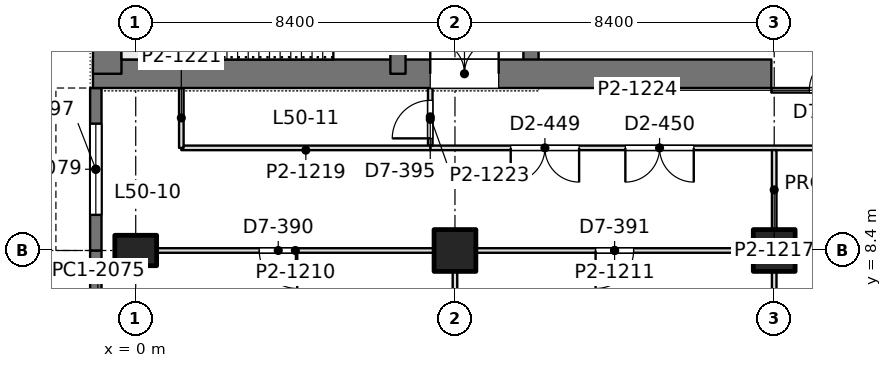
"""IFC4 building model, lengths in metres.
Left out: names, types, materials, properties, quantities, classifications, styles, units other than length and angle.
Written with IfcOpenShell. Run it as: python <this file> out.ifc"""

import sys

from ifc_helpers import new_model, si_unit, direction, frame, frame_2d, origin, origin_2d, place, context, subcontext, project, spatial, rectangle, extrude, element, fill, save


model = new_model("IFC4")
c1 = context("Model", 3, precision=1e-05, world=origin(), true_north=direction((0.0, 1.0)))
c2 = subcontext(c1, "Body", "Model", "MODEL_VIEW")
j1 = project(units=[si_unit("LENGTHUNIT", "METRE"), si_unit("PLANEANGLEUNIT", "RADIAN")], contexts=[c1])
p1 = place(None, origin())
s1 = spatial("IfcSite", under=j1, at=p1, CompositionType="ELEMENT")
p2 = place(p1, origin())
s2 = spatial("IfcBuilding", under=s1, at=p2, CompositionType="ELEMENT")
p3 = place(p2, frame((0.0, 0.0, 219.6)))
s3 = spatial("IfcBuildingStorey", under=s2, at=p3, CompositionType="ELEMENT", Elevation=219.6)
p4 = place(p3, frame((0.0, 8.4, 0.0), z_axis=(0.0, 0.0, 1.0), x_axis=(0.0, 1.0, 0.0)))
e1 = element("IfcColumn", 1, at=p4, inside=s3, PredefinedType="COLUMN", context=c2, shape_type="SweptSolid", body=[
    extrude(rectangle(XDim=0.8, YDim=1.1, at=origin_2d()), origin(), (0.0, 0.0, 1.0), 4.2),
])
for number, where, z_axis, x_axis in (
    (2, (8.4, 8.4, 0.0), (0.0, 0.0, 1.0), (1.0, 0.0, 0.0)),
    (3, (16.8, 8.4, 0.0), (0.0, 0.0, 1.0), (1.0, 0.0, 0.0)),
):
    element("IfcColumn", number, at=place(p3, frame(where, z_axis=z_axis, x_axis=x_axis)), inside=s3, PredefinedType="COLUMN", context=c2, shape_type="SweptSolid", body=[
        extrude(rectangle(XDim=1.1, YDim=1.1, at=origin_2d()), origin(), (0.0, 0.0, 1.0), 4.2),
    ])
p5 = place(p3, frame((-1.125, 13.05, 0.0), z_axis=(0.0, 0.0, 1.0), x_axis=(1.0, 0.0, 0.0)))
e4 = element("IfcWall", 4, at=p5, inside=s3, PredefinedType="SHEAR", context=c2, shape_type="SweptSolid", body=[
    extrude(rectangle(XDim=17.85, YDim=0.75, at=frame_2d((8.925, 0.0))), origin(), (0.0, 0.0, 1.0), 4.2),
])
p6 = place(p5, frame((8.875, 0.0, 0.0)))
e5 = element("IfcOpeningElement", 5, at=p6, cuts=e4, PredefinedType="OPENING", context=c2, shape_type="SweptSolid", body=[
    extrude(rectangle(XDim=1.8, YDim=2.4, at=frame_2d((0.9, 1.2))), frame((0.0, 0.385, 0.0), z_axis=(0.0, -1.0, 0.0), x_axis=(1.0, 0.0, 0.0)), (0.0, 0.0, 1.0), 0.77),
])
p7 = place(p3, frame((-0.75, 13.05, 0.0), z_axis=(0.0, 0.0, 1.0), x_axis=(0.0, 1.0, 0.0)))
e6 = element("IfcWall", 6, at=p7, inside=s3, PredefinedType="SHEAR", context=c2, shape_type="SweptSolid", body=[
    extrude(rectangle(XDim=24.3, YDim=0.75, at=frame_2d((12.15, 0.0))), origin(), (0.0, 0.0, 1.0), 4.2),
])
p8 = place(p3, frame((6.9, 13.05, 0.0), z_axis=(0.0, 0.0, 1.0), x_axis=(0.0, 1.0, 0.0)))
e7 = element("IfcWall", 7, at=p8, inside=s3, PredefinedType="SHEAR", context=c2, shape_type="SweptSolid", body=[
    extrude(rectangle(XDim=24.3, YDim=0.4, at=frame_2d((12.15, 0.0))), origin(), (0.0, 0.0, 1.0), 4.2),
])
p9 = place(p8, frame((1.3, 0.0, 0.0)))
e8 = element("IfcOpeningElement", 8, at=p9, cuts=e7, PredefinedType="OPENING", context=c2, shape_type="SweptSolid", body=[
    extrude(rectangle(XDim=1.0, YDim=2.2, at=frame_2d((0.5, 1.1))), frame((0.0, 0.21, 0.0), z_axis=(0.0, -1.0, 0.0), x_axis=(1.0, 0.0, 0.0)), (0.0, 0.0, 1.0), 0.42),
])
p10 = place(p8, frame((22.0, 0.0, 0.0)))
e9 = element("IfcOpeningElement", 9, at=p10, cuts=e7, PredefinedType="OPENING", context=c2, shape_type="SweptSolid", body=[
    extrude(rectangle(XDim=1.0, YDim=2.2, at=frame_2d((0.5, 1.1))), frame((0.0, 0.21, 0.0), z_axis=(0.0, -1.0, 0.0), x_axis=(1.0, 0.0, 0.0)), (0.0, 0.0, 1.0), 0.42),
])
p11 = place(p8, frame((5.55, 0.0, 0.0)))
e10 = element("IfcOpeningElement", 10, at=p11, cuts=e7, PredefinedType="OPENING", context=c2, shape_type="SweptSolid", body=[
    extrude(rectangle(XDim=1.0, YDim=2.2, at=frame_2d((0.5, 1.1))), frame((0.0, 0.21, 0.0), z_axis=(0.0, -1.0, 0.0), x_axis=(1.0, 0.0, 0.0)), (0.0, 0.0, 1.0), 0.42),
])
p12 = place(p8, frame((9.55, 0.0, 0.0)))
e11 = element("IfcOpeningElement", 11, at=p12, cuts=e7, PredefinedType="OPENING", context=c2, shape_type="SweptSolid", body=[
    extrude(rectangle(XDim=1.0, YDim=2.2, at=frame_2d((0.5, 1.1))), frame((0.0, 0.21, 0.0), z_axis=(0.0, -1.0, 0.0), x_axis=(1.0, 0.0, 0.0)), (0.0, 0.0, 1.0), 0.42),
])
p13 = place(p8, frame((12.8, 0.0, 0.0)))
e12 = element("IfcOpeningElement", 12, at=p13, cuts=e7, PredefinedType="OPENING", context=c2, shape_type="SweptSolid", body=[
    extrude(rectangle(XDim=1.1, YDim=2.2, at=frame_2d((0.55, 1.1))), frame((0.0, 0.21, 0.0), z_axis=(0.0, -1.0, 0.0), x_axis=(1.0, 0.0, 0.0)), (0.0, 0.0, 1.0), 0.42),
])
p14 = place(p8, frame((15.538, 0.0, 0.0)))
e13 = element("IfcOpeningElement", 13, at=p14, cuts=e7, PredefinedType="OPENING", context=c2, shape_type="SweptSolid", body=[
    extrude(rectangle(XDim=1.1, YDim=2.2, at=frame_2d((0.55, 1.1))), frame((0.0, 0.21, 0.0), z_axis=(0.0, -1.0, 0.0), x_axis=(1.0, 0.0, 0.0)), (0.0, 0.0, 1.0), 0.42),
])
p15 = place(p8, frame((18.262, 0.0, 0.0)))
e14 = element("IfcOpeningElement", 14, at=p15, cuts=e7, PredefinedType="OPENING", context=c2, shape_type="SweptSolid", body=[
    extrude(rectangle(XDim=1.1, YDim=2.2, at=frame_2d((0.55, 1.1))), frame((0.0, 0.21, 0.0), z_axis=(0.0, -1.0, 0.0), x_axis=(1.0, 0.0, 0.0)), (0.0, 0.0, 1.0), 0.42),
])
p16 = place(p3, frame((10.4, 13.05, 0.0), z_axis=(0.0, 0.0, 1.0), x_axis=(0.0, 1.0, 0.0)))
e15 = element("IfcWall", 15, at=p16, inside=s3, PredefinedType="SHEAR", context=c2, shape_type="SweptSolid", body=[
    extrude(rectangle(XDim=24.3, YDim=0.4, at=frame_2d((12.15, 0.0))), origin(), (0.0, 0.0, 1.0), 4.2),
])
p17 = place(p16, frame((15.75, 0.0, 0.0)))
e16 = element("IfcOpeningElement", 16, at=p17, cuts=e15, PredefinedType="OPENING", context=c2, shape_type="SweptSolid", body=[
    extrude(rectangle(XDim=1.1, YDim=2.2, at=frame_2d((0.55, 1.1))), frame((0.0, 0.21, 0.0), z_axis=(0.0, -1.0, 0.0), x_axis=(1.0, 0.0, 0.0)), (0.0, 0.0, 1.0), 0.42),
])
p18 = place(p16, frame((18.6, 0.0, 0.0)))
e17 = element("IfcOpeningElement", 17, at=p18, cuts=e15, PredefinedType="OPENING", context=c2, shape_type="SweptSolid", body=[
    extrude(rectangle(XDim=1.1, YDim=2.2, at=frame_2d((0.55, 1.1))), frame((0.0, 0.21, 0.0), z_axis=(0.0, -1.0, 0.0), x_axis=(1.0, 0.0, 0.0)), (0.0, 0.0, 1.0), 0.42),
])
p19 = place(p16, frame((21.45, 0.0, 0.0)))
e18 = element("IfcOpeningElement", 18, at=p19, cuts=e15, PredefinedType="OPENING", context=c2, shape_type="SweptSolid", body=[
    extrude(rectangle(XDim=1.1, YDim=2.2, at=frame_2d((0.55, 1.1))), frame((0.0, 0.21, 0.0), z_axis=(0.0, -1.0, 0.0), x_axis=(1.0, 0.0, 0.0)), (0.0, 0.0, 1.0), 0.42),
])
p20 = place(p16, frame((8.65, 0.0, 0.0)))
e19 = element("IfcOpeningElement", 19, at=p20, cuts=e15, PredefinedType="OPENING", context=c2, shape_type="SweptSolid", body=[
    extrude(rectangle(XDim=1.8, YDim=2.4, at=frame_2d((0.9, 1.2))), frame((0.0, 0.21, 0.0), z_axis=(0.0, -1.0, 0.0), x_axis=(1.0, 0.0, 0.0)), (0.0, 0.0, 1.0), 0.42),
])
p21 = place(p3, frame((-1.05, 5.915, 0.0), z_axis=(0.0, 0.0, 1.0), x_axis=(0.0, 1.0, 0.0)))
e20 = element("IfcWall", 20, at=p21, inside=s3, PredefinedType="SOLIDWALL", context=c2, shape_type="SweptSolid", body=[
    extrude(rectangle(XDim=2.485, YDim=0.3, at=frame_2d((1.243, 0.0))), origin(), (0.0, 0.0, 1.0), 4.05),
])
p22 = place(p3, frame((-1.05, 8.4, 0.0), z_axis=(0.0, 0.0, 1.0), x_axis=(0.0, 1.0, 0.0)))
e21 = element("IfcWall", 21, at=p22, inside=s3, PredefinedType="SOLIDWALL", context=c2, shape_type="SweptSolid", body=[
    extrude(rectangle(XDim=4.275, YDim=0.3, at=frame_2d((2.138, 0.0))), origin(), (0.0, 0.0, 1.0), 4.05),
])
p23 = place(p22, frame((0.938, 0.0, 0.9)))
e22 = element("IfcOpeningElement", 22, at=p23, cuts=e21, PredefinedType="OPENING", context=c2, shape_type="SweptSolid", body=[
    extrude(rectangle(XDim=2.4, YDim=1.9, at=frame_2d((1.2, 0.95))), frame((0.0, 0.16, 0.0), z_axis=(0.0, -1.0, 0.0), x_axis=(1.0, 0.0, 0.0)), (0.0, 0.0, 1.0), 0.32),
])
p24 = place(p3, frame((0.549, 8.4, 0.0), z_axis=(0.0, 0.0, 1.0), x_axis=(1.0, 0.0, 0.0)))
e23 = element("IfcWall", 23, at=p24, inside=s3, PredefinedType="PARTITIONING", context=c2, shape_type="SweptSolid", body=[
    extrude(rectangle(XDim=7.302, YDim=0.12, at=frame_2d((3.651, 0.0))), origin(), (0.0, 0.0, 1.0), 3.55),
])
p25 = place(p24, frame((2.701, 0.0, 0.0)))
e24 = element("IfcOpeningElement", 24, at=p25, cuts=e23, PredefinedType="OPENING", context=c2, shape_type="SweptSolid", body=[
    extrude(rectangle(XDim=1.0, YDim=2.4, at=frame_2d((0.5, 1.2))), frame((0.0, 0.07, 0.0), z_axis=(0.0, -1.0, 0.0), x_axis=(1.0, 0.0, 0.0)), (0.0, 0.0, 1.0), 0.14),
])
p26 = place(p3, frame((8.949, 8.4, 0.0), z_axis=(0.0, 0.0, 1.0), x_axis=(1.0, 0.0, 0.0)))
e25 = element("IfcWall", 25, at=p26, inside=s3, PredefinedType="PARTITIONING", context=c2, shape_type="SweptSolid", body=[
    extrude(rectangle(XDim=7.302, YDim=0.12, at=frame_2d((3.651, 0.0))), origin(), (0.0, 0.0, 1.0), 3.55),
])
p27 = place(p26, frame((3.151, 0.0, 0.0)))
e26 = element("IfcOpeningElement", 26, at=p27, cuts=e25, PredefinedType="OPENING", context=c2, shape_type="SweptSolid", body=[
    extrude(rectangle(XDim=1.0, YDim=2.4, at=frame_2d((0.5, 1.2))), frame((0.0, 0.07, 0.0), z_axis=(0.0, -1.0, 0.0), x_axis=(1.0, 0.0, 0.0)), (0.0, 0.0, 1.0), 0.14),
])
p28 = place(p3, frame((17.349, 8.4, 0.0), z_axis=(0.0, 0.0, 1.0), x_axis=(1.0, 0.0, 0.0)))
e27 = element("IfcWall", 27, at=p28, inside=s3, PredefinedType="PARTITIONING", context=c2, shape_type="SweptSolid", body=[
    extrude(rectangle(XDim=7.302, YDim=0.12, at=frame_2d((3.651, 0.0))), origin(), (0.0, 0.0, 1.0), 3.55),
])
p29 = place(p28, frame((3.151, 0.0, 0.0)))
e28 = element("IfcOpeningElement", 28, at=p29, cuts=e27, PredefinedType="OPENING", context=c2, shape_type="SweptSolid", body=[
    extrude(rectangle(XDim=1.0, YDim=2.4, at=frame_2d((0.5, 1.2))), frame((0.0, 0.07, 0.0), z_axis=(0.0, -1.0, 0.0), x_axis=(1.0, 0.0, 0.0)), (0.0, 0.0, 1.0), 0.14),
])
for number, where, z_axis, x_axis in (
    (29, (8.4, 6.149, 0.0), (0.0, 0.0, 1.0), (0.0, 1.0, 0.0)),
    (30, (16.8, 6.149, 0.0), (0.0, 0.0, 1.0), (0.0, 1.0, 0.0)),
):
    element("IfcWall", number, at=place(p3, frame(where, z_axis=z_axis, x_axis=x_axis)), inside=s3, PredefinedType="PARTITIONING", context=c2, shape_type="SweptSolid", body=[
        extrude(rectangle(XDim=1.702, YDim=0.12, at=frame_2d((0.851, 0.0))), origin(), (0.0, 0.0, 1.0), 3.69),
    ])
p30 = place(p3, frame((16.8, 8.949, 0.0), z_axis=(0.0, 0.0, 1.0), x_axis=(0.0, 1.0, 0.0)))
e31 = element("IfcWall", 31, at=p30, inside=s3, PredefinedType="PARTITIONING", context=c2, shape_type="SweptSolid", body=[
    extrude(rectangle(XDim=2.093, YDim=0.12, at=frame_2d((1.046, 0.0))), origin(), (0.0, 0.0, 1.0), 3.69),
])
p31 = place(p3, frame((7.748, 11.1, 0.0), z_axis=(0.0, 0.0, 1.0), x_axis=(1.0, 0.0, 0.0)))
e32 = element("IfcWall", 32, at=p31, inside=s3, PredefinedType="PARTITIONING", context=c2, shape_type="SweptSolid", body=[
    extrude(rectangle(XDim=41.452, YDim=0.12, at=frame_2d((20.726, 0.0))), origin(), (0.0, 0.0, 1.0), 3.55),
])
p32 = place(p31, frame((2.119, 0.0, 0.0)))
e33 = element("IfcOpeningElement", 33, at=p32, cuts=e32, PredefinedType="OPENING", context=c2, shape_type="SweptSolid", body=[
    extrude(rectangle(XDim=1.8, YDim=2.2, at=frame_2d((0.9, 1.1))), frame((0.0, 0.07, 0.0), z_axis=(0.0, -1.0, 0.0), x_axis=(1.0, 0.0, 0.0)), (0.0, 0.0, 1.0), 0.14),
])
p33 = place(p31, frame((5.135, 0.0, 0.0)))
e34 = element("IfcOpeningElement", 34, at=p33, cuts=e32, PredefinedType="OPENING", context=c2, shape_type="SweptSolid", body=[
    extrude(rectangle(XDim=1.8, YDim=2.2, at=frame_2d((0.9, 1.1))), frame((0.0, 0.07, 0.0), z_axis=(0.0, -1.0, 0.0), x_axis=(1.0, 0.0, 0.0)), (0.0, 0.0, 1.0), 0.14),
])
p34 = place(p31, frame((12.352, 0.0, 0.0)))
e35 = element("IfcOpeningElement", 35, at=p34, cuts=e32, PredefinedType="OPENING", context=c2, shape_type="SweptSolid", body=[
    extrude(rectangle(XDim=1.8, YDim=2.2, at=frame_2d((0.9, 1.1))), frame((0.0, 0.07, 0.0), z_axis=(0.0, -1.0, 0.0), x_axis=(1.0, 0.0, 0.0)), (0.0, 0.0, 1.0), 0.14),
])
p35 = place(p31, frame((20.752, 0.0, 0.0)))
e36 = element("IfcOpeningElement", 36, at=p35, cuts=e32, PredefinedType="OPENING", context=c2, shape_type="SweptSolid", body=[
    extrude(rectangle(XDim=1.8, YDim=2.2, at=frame_2d((0.9, 1.1))), frame((0.0, 0.07, 0.0), z_axis=(0.0, -1.0, 0.0), x_axis=(1.0, 0.0, 0.0)), (0.0, 0.0, 1.0), 0.14),
])
p36 = place(p31, frame((24.952, 0.0, 0.0)))
e37 = element("IfcOpeningElement", 37, at=p36, cuts=e32, PredefinedType="OPENING", context=c2, shape_type="SweptSolid", body=[
    extrude(rectangle(XDim=1.8, YDim=2.2, at=frame_2d((0.9, 1.1))), frame((0.0, 0.07, 0.0), z_axis=(0.0, -1.0, 0.0), x_axis=(1.0, 0.0, 0.0)), (0.0, 0.0, 1.0), 0.14),
])
p37 = place(p31, frame((32.952, 0.0, 0.0)))
e38 = element("IfcOpeningElement", 38, at=p37, cuts=e32, PredefinedType="OPENING", context=c2, shape_type="SweptSolid", body=[
    extrude(rectangle(XDim=1.8, YDim=2.2, at=frame_2d((0.9, 1.1))), frame((0.0, 0.07, 0.0), z_axis=(0.0, -1.0, 0.0), x_axis=(1.0, 0.0, 0.0)), (0.0, 0.0, 1.0), 0.14),
])
p38 = place(p31, frame((36.752, 0.0, 0.0)))
e39 = element("IfcOpeningElement", 39, at=p38, cuts=e32, PredefinedType="OPENING", context=c2, shape_type="SweptSolid", body=[
    extrude(rectangle(XDim=1.8, YDim=2.2, at=frame_2d((0.9, 1.1))), frame((0.0, 0.07, 0.0), z_axis=(0.0, -1.0, 0.0), x_axis=(1.0, 0.0, 0.0)), (0.0, 0.0, 1.0), 0.14),
])
p39 = place(p3, frame((7.75, 11.158, 0.0), z_axis=(0.0, 0.0, 1.0), x_axis=(0.0, 1.0, 0.0)))
e40 = element("IfcWall", 40, at=p39, inside=s3, PredefinedType="PARTITIONING", context=c2, shape_type="SweptSolid", body=[
    extrude(rectangle(XDim=1.518, YDim=0.12, at=frame_2d((0.759, 0.0))), origin(), (0.0, 0.0, 1.0), 4.05),
])
p40 = place(p39, frame((0.192, 0.0, 0.0)))
e41 = element("IfcOpeningElement", 41, at=p40, cuts=e40, PredefinedType="OPENING", context=c2, shape_type="SweptSolid", body=[
    extrude(rectangle(XDim=1.0, YDim=2.4, at=frame_2d((0.5, 1.2))), frame((0.0, 0.07, 0.0), z_axis=(0.0, -1.0, 0.0), x_axis=(1.0, 0.0, 0.0)), (0.0, 0.0, 1.0), 0.14),
])
p41 = place(p3, frame((1.2, 11.1, 0.0), z_axis=(0.0, 0.0, 1.0), x_axis=(1.0, 0.0, 0.0)))
e42 = element("IfcWall", 42, at=p41, inside=s3, PredefinedType="PARTITIONING", context=c2, shape_type="SweptSolid", body=[
    extrude(rectangle(XDim=6.552, YDim=0.12, at=frame_2d((3.276, 0.0))), origin(), (0.0, 0.0, 1.0), 4.05),
])
p42 = place(p3, frame((1.2, 11.1, 0.0), z_axis=(0.0, 0.0, 1.0), x_axis=(0.0, 1.0, 0.0)))
e43 = element("IfcWall", 43, at=p42, inside=s3, PredefinedType="PARTITIONING", context=c2, shape_type="SweptSolid", body=[
    extrude(rectangle(XDim=1.576, YDim=0.12, at=frame_2d((0.788, 0.0))), origin(), (0.0, 0.0, 1.0), 4.05),
])
p43 = place(p3, frame((16.725, 12.615, 0.0), z_axis=(0.0, 0.0, 1.0), x_axis=(1.0, 0.0, 0.0)))
e44 = element("IfcWall", 44, at=p43, inside=s3, PredefinedType="PARTITIONING", context=c2, shape_type="SweptSolid", body=[
    extrude(rectangle(XDim=16.95, YDim=0.12, at=frame_2d((8.475, 0.0))), origin(), (0.0, 0.0, 1.0), 3.55),
])
p44 = place(p43, frame((1.0, 0.0, 0.0)))
e45 = element("IfcOpeningElement", 45, at=p44, cuts=e44, PredefinedType="OPENING", context=c2, shape_type="SweptSolid", body=[
    extrude(rectangle(XDim=1.0, YDim=2.4, at=frame_2d((0.5, 1.2))), frame((0.0, 0.07, 0.0), z_axis=(0.0, -1.0, 0.0), x_axis=(1.0, 0.0, 0.0)), (0.0, 0.0, 1.0), 0.14),
])
p45 = place(p43, frame((6.665, 0.0, 0.0)))
e46 = element("IfcOpeningElement", 46, at=p45, cuts=e44, PredefinedType="OPENING", context=c2, shape_type="SweptSolid", body=[
    extrude(rectangle(XDim=1.0, YDim=2.4, at=frame_2d((0.5, 1.2))), frame((0.0, 0.07, 0.0), z_axis=(0.0, -1.0, 0.0), x_axis=(1.0, 0.0, 0.0)), (0.0, 0.0, 1.0), 0.14),
])
p46 = place(p43, frame((13.64, 0.0, 0.0)))
e47 = element("IfcOpeningElement", 47, at=p46, cuts=e44, PredefinedType="OPENING", context=c2, shape_type="SweptSolid", body=[
    extrude(rectangle(XDim=1.0, YDim=2.4, at=frame_2d((0.5, 1.2))), frame((0.0, 0.07, 0.0), z_axis=(0.0, -1.0, 0.0), x_axis=(1.0, 0.0, 0.0)), (0.0, 0.0, 1.0), 0.14),
])
p47 = place(p23, origin())
e48 = element("IfcWindow", 48, at=p47, inside=s3, PartitioningType="SINGLE_PANEL", PredefinedType="WINDOW", context=c2, shape_type="SweptSolid", body=[
    extrude(rectangle(XDim=2.4, YDim=1.9, at=frame_2d((1.2, 0.95))), frame((0.0, 0.03, 0.0), z_axis=(0.0, -1.0, 0.0), x_axis=(1.0, 0.0, 0.0)), (0.0, 0.0, 1.0), 0.06),
])
fill(e22, e48)
p48 = place(p6, origin())
e49 = element("IfcDoor", 49, at=p48, inside=s3, OperationType="DOUBLE_DOOR_SINGLE_SWING", PredefinedType="DOOR", context=c2, shape_type="SweptSolid", body=[
    extrude(rectangle(XDim=1.8, YDim=2.4, at=frame_2d((0.9, 1.2))), frame((0.0, 0.025, 0.0), z_axis=(0.0, -1.0, 0.0), x_axis=(1.0, 0.0, 0.0)), (0.0, 0.0, 1.0), 0.05),
])
fill(e5, e49)
p49 = place(p25, frame((1.0, 0.0, 0.0), z_axis=(0.0, 0.0, 1.0), x_axis=(-1.0, 0.0, 0.0)))
e50 = element("IfcDoor", 50, at=p49, inside=s3, OperationType="SINGLE_SWING_LEFT", PredefinedType="DOOR", context=c2, shape_type="SweptSolid", body=[
    extrude(rectangle(XDim=1.0, YDim=2.4, at=frame_2d((0.5, 1.2))), frame((0.0, 0.025, 0.0), z_axis=(0.0, -1.0, 0.0), x_axis=(1.0, 0.0, 0.0)), (0.0, 0.0, 1.0), 0.05),
])
fill(e24, e50)
p50 = place(p27, frame((1.0, 0.0, 0.0), z_axis=(0.0, 0.0, 1.0), x_axis=(-1.0, 0.0, 0.0)))
e51 = element("IfcDoor", 51, at=p50, inside=s3, OperationType="SINGLE_SWING_RIGHT", PredefinedType="DOOR", context=c2, shape_type="SweptSolid", body=[
    extrude(rectangle(XDim=1.0, YDim=2.4, at=frame_2d((0.5, 1.2))), frame((0.0, 0.025, 0.0), z_axis=(0.0, -1.0, 0.0), x_axis=(1.0, 0.0, 0.0)), (0.0, 0.0, 1.0), 0.05),
])
fill(e26, e51)
p51 = place(p32, frame((1.8, 0.0, 0.0), z_axis=(0.0, 0.0, 1.0), x_axis=(-1.0, 0.0, 0.0)))
e52 = element("IfcDoor", 52, at=p51, inside=s3, OperationType="DOUBLE_DOOR_SINGLE_SWING", PredefinedType="DOOR", context=c2, shape_type="SweptSolid", body=[
    extrude(rectangle(XDim=1.8, YDim=2.2, at=frame_2d((0.9, 1.1))), frame((0.0, 0.025, 0.0), z_axis=(0.0, -1.0, 0.0), x_axis=(1.0, 0.0, 0.0)), (0.0, 0.0, 1.0), 0.05),
])
fill(e33, e52)
p52 = place(p33, frame((1.8, 0.0, 0.0), z_axis=(0.0, 0.0, 1.0), x_axis=(-1.0, 0.0, 0.0)))
e53 = element("IfcDoor", 53, at=p52, inside=s3, OperationType="DOUBLE_DOOR_SINGLE_SWING", PredefinedType="DOOR", context=c2, shape_type="SweptSolid", body=[
    extrude(rectangle(XDim=1.8, YDim=2.2, at=frame_2d((0.9, 1.1))), frame((0.0, 0.025, 0.0), z_axis=(0.0, -1.0, 0.0), x_axis=(1.0, 0.0, 0.0)), (0.0, 0.0, 1.0), 0.05),
])
fill(e34, e53)
p53 = place(p40, origin())
e54 = element("IfcDoor", 54, at=p53, inside=s3, OperationType="SINGLE_SWING_LEFT", PredefinedType="DOOR", context=c2, shape_type="SweptSolid", body=[
    extrude(rectangle(XDim=1.0, YDim=2.4, at=frame_2d((0.5, 1.2))), frame((0.0, 0.025, 0.0), z_axis=(0.0, -1.0, 0.0), x_axis=(1.0, 0.0, 0.0)), (0.0, 0.0, 1.0), 0.05),
])
fill(e41, e54)
p54 = place(p44, origin())
e55 = element("IfcDoor", 55, at=p54, inside=s3, OperationType="SINGLE_SWING_RIGHT", PredefinedType="DOOR", context=c2, shape_type="SweptSolid", body=[
    extrude(rectangle(XDim=1.0, YDim=2.4, at=frame_2d((0.5, 1.2))), frame((0.0, 0.025, 0.0), z_axis=(0.0, -1.0, 0.0), x_axis=(1.0, 0.0, 0.0)), (0.0, 0.0, 1.0), 0.05),
])
fill(e45, e55)
save(model, sys.argv[1])
